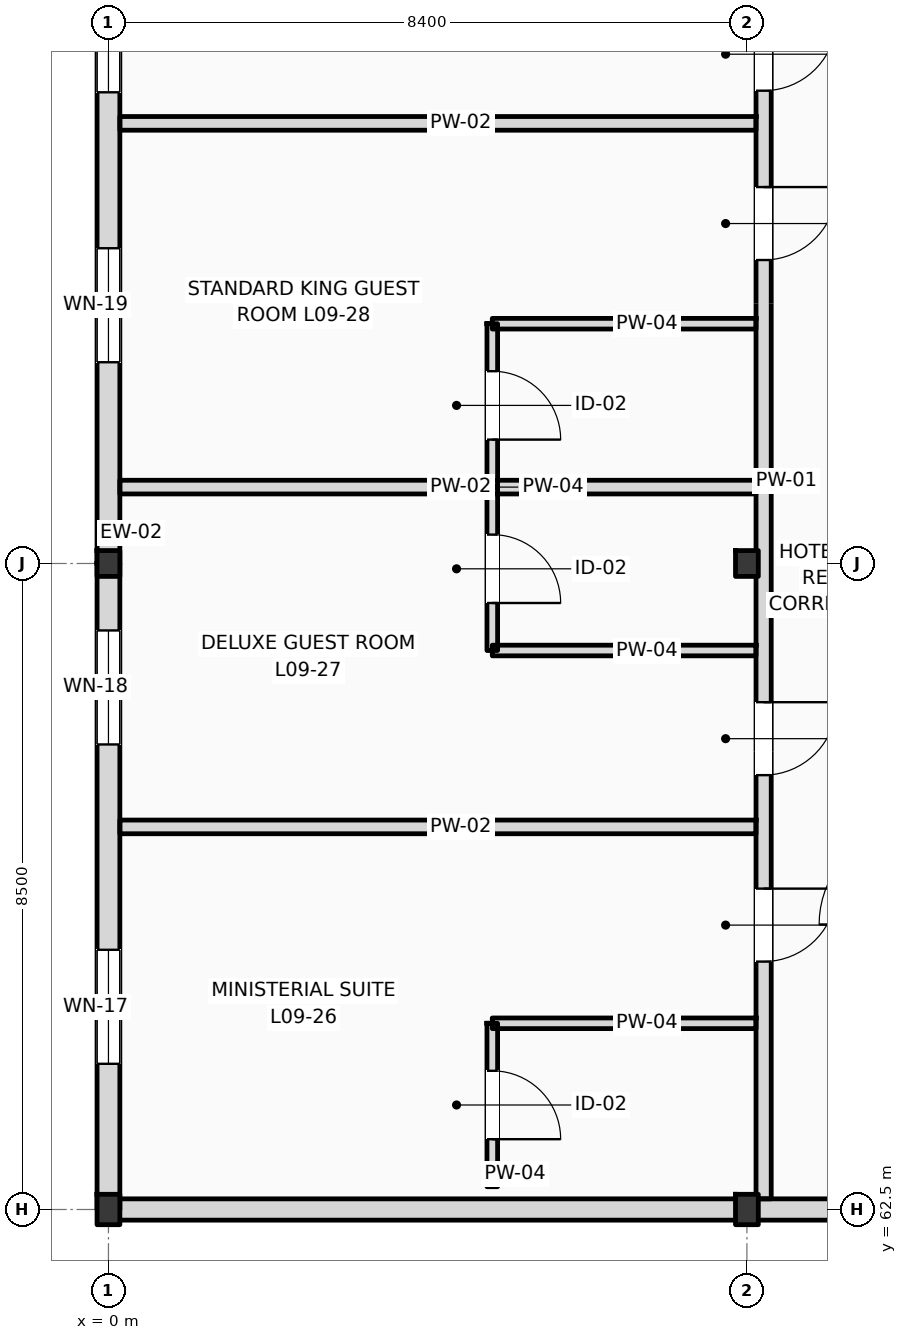
"""IFC4 building model, lengths in metres.
Left out: names, types, materials, properties, quantities, classifications, styles, units other than length and angle.
Written with IfcOpenShell. Run it as: python <this file> out.ifc"""

import sys

from ifc_helpers import new_model, si_unit, direction, frame, frame_2d, origin, origin_2d, place, context, subcontext, project, spatial, rectangle, i_section, extrude, element, fill, save


model = new_model("IFC4")
c1 = context("Model", 3, precision=1e-05, world=origin(), true_north=direction((0.0, 1.0)))
c2 = subcontext(c1, "Body", "Model", "MODEL_VIEW")
j1 = project(units=[si_unit("LENGTHUNIT", "METRE"), si_unit("PLANEANGLEUNIT", "RADIAN")], contexts=[c1])
p1 = place(None, origin())
s1 = spatial("IfcSite", under=j1, at=p1, CompositionType="ELEMENT")
p2 = place(p1, origin())
s2 = spatial("IfcBuilding", under=s1, at=p2, CompositionType="ELEMENT")
p3 = place(p2, frame((0.0, 0.0, 39.0)))
s3 = spatial("IfcBuildingStorey", under=s2, at=p3, CompositionType="ELEMENT", Elevation=39.0)
p4 = place(p3, frame((0.0, 62.5, 0.0), z_axis=(0.0, 0.0, 1.0), x_axis=(1.0, 0.0, 0.0)))
e1 = element("IfcColumn", 1, at=p4, inside=s3, PredefinedType="COLUMN", context=c2, shape_type="SweptSolid", body=[
    extrude(i_section(OverallWidth=0.3, OverallDepth=0.4, WebThickness=0.013, FlangeThickness=0.024, FilletRadius=0.027, at=origin_2d()), origin(), (0.0, 0.0, 1.0), 3.6),
])
p5 = place(p3, frame((0.0, 71.0, 0.0), z_axis=(0.0, 0.0, 1.0), x_axis=(1.0, 0.0, 0.0)))
e2 = element("IfcColumn", 2, at=p5, inside=s3, PredefinedType="COLUMN", context=c2, shape_type="SweptSolid", body=[
    extrude(i_section(OverallWidth=0.3, OverallDepth=0.34, WebThickness=0.012, FlangeThickness=0.021, FilletRadius=0.027, at=origin_2d()), origin(), (0.0, 0.0, 1.0), 3.6),
])
p6 = place(p3, frame((8.4, 62.5, 0.0), z_axis=(0.0, 0.0, 1.0), x_axis=(1.0, 0.0, 0.0)))
e3 = element("IfcColumn", 3, at=p6, inside=s3, PredefinedType="COLUMN", context=c2, shape_type="SweptSolid", body=[
    extrude(i_section(OverallWidth=0.3, OverallDepth=0.4, WebThickness=0.013, FlangeThickness=0.024, FilletRadius=0.027, at=origin_2d()), origin(), (0.0, 0.0, 1.0), 3.6),
])
p7 = place(p3, frame((8.4, 71.0, 0.0), z_axis=(0.0, 0.0, 1.0), x_axis=(1.0, 0.0, 0.0)))
e4 = element("IfcColumn", 4, at=p7, inside=s3, PredefinedType="COLUMN", context=c2, shape_type="SweptSolid", body=[
    extrude(i_section(OverallWidth=0.3, OverallDepth=0.34, WebThickness=0.012, FlangeThickness=0.021, FilletRadius=0.027, at=origin_2d()), origin(), (0.0, 0.0, 1.0), 3.6),
])
p8 = place(p3, frame((0.0, 62.5, 0.0), z_axis=(0.0, 0.0, 1.0), x_axis=(0.0, 1.0, 0.0)))
e5 = element("IfcWall", 5, at=p8, inside=s3, PredefinedType="STANDARD", context=c2, shape_type="SweptSolid", body=[
    extrude(rectangle(XDim=8.5, YDim=0.3, at=frame_2d((4.25, 0.0))), origin(), (0.0, 0.0, 1.0), 2.91),
])
p9 = place(p8, frame((1.917, 0.0, 0.9)))
e6 = element("IfcOpeningElement", 6, at=p9, cuts=e5, PredefinedType="OPENING", context=c2, shape_type="SweptSolid", body=[
    extrude(rectangle(XDim=1.5, YDim=1.83, at=frame_2d((0.75, 0.915))), frame((0.0, 0.16, 0.0), z_axis=(0.0, -1.0, 0.0), x_axis=(1.0, 0.0, 0.0)), (0.0, 0.0, 1.0), 0.32),
])
p10 = place(p8, frame((6.119, 0.0, 0.9)))
e7 = element("IfcOpeningElement", 7, at=p10, cuts=e5, PredefinedType="OPENING", context=c2, shape_type="SweptSolid", body=[
    extrude(rectangle(XDim=1.5, YDim=1.83, at=frame_2d((0.75, 0.915))), frame((0.0, 0.16, 0.0), z_axis=(0.0, -1.0, 0.0), x_axis=(1.0, 0.0, 0.0)), (0.0, 0.0, 1.0), 0.32),
])
p11 = place(p3, frame((0.0, 71.0, 0.0), z_axis=(0.0, 0.0, 1.0), x_axis=(0.0, 1.0, 0.0)))
e8 = element("IfcWall", 8, at=p11, inside=s3, PredefinedType="STANDARD", context=c2, shape_type="SweptSolid", body=[
    extrude(rectangle(XDim=8.5, YDim=0.3, at=frame_2d((4.25, 0.0))), origin(), (0.0, 0.0, 1.0), 2.91),
])
p12 = place(p11, frame((2.648, 0.0, 0.9)))
e9 = element("IfcOpeningElement", 9, at=p12, cuts=e8, PredefinedType="OPENING", context=c2, shape_type="SweptSolid", body=[
    extrude(rectangle(XDim=1.5, YDim=1.83, at=frame_2d((0.75, 0.915))), frame((0.0, 0.16, 0.0), z_axis=(0.0, -1.0, 0.0), x_axis=(1.0, 0.0, 0.0)), (0.0, 0.0, 1.0), 0.32),
])
p13 = place(p11, frame((6.2, 0.0, 0.9)))
e10 = element("IfcOpeningElement", 10, at=p13, cuts=e8, PredefinedType="OPENING", context=c2, shape_type="SweptSolid", body=[
    extrude(rectangle(XDim=1.5, YDim=1.83, at=frame_2d((0.75, 0.915))), frame((0.0, 0.16, 0.0), z_axis=(0.0, -1.0, 0.0), x_axis=(1.0, 0.0, 0.0)), (0.0, 0.0, 1.0), 0.32),
])
p14 = place(p3, frame((0.0, 62.5, 0.0), z_axis=(0.0, 0.0, 1.0), x_axis=(1.0, 0.0, 0.0)))
e11 = element("IfcWall", 11, at=p14, inside=s3, PredefinedType="STANDARD", context=c2, shape_type="SweptSolid", body=[
    extrude(rectangle(XDim=25.2, YDim=0.28, at=frame_2d((12.6, 0.0))), origin(), (0.0, 0.0, 1.0), 2.72),
])
p15 = place(p3, frame((8.62, 62.64, 0.0), z_axis=(0.0, 0.0, 1.0), x_axis=(0.0, 1.0, 0.0)))
e12 = element("IfcWall", 12, at=p15, inside=s3, PredefinedType="PARTITIONING", context=c2, shape_type="SweptSolid", body=[
    extrude(rectangle(XDim=32.66, YDim=0.2, at=frame_2d((16.33, 0.0))), origin(), (0.0, 0.0, 1.0), 2.91),
])
p16 = place(p15, frame((3.122, 0.0, 0.0)))
e13 = element("IfcOpeningElement", 13, at=p16, cuts=e12, PredefinedType="OPENING", context=c2, shape_type="SweptSolid", body=[
    extrude(rectangle(XDim=0.96, YDim=2.2, at=frame_2d((0.48, 1.1))), frame((0.0, 0.11, 0.0), z_axis=(0.0, -1.0, 0.0), x_axis=(1.0, 0.0, 0.0)), (0.0, 0.0, 1.0), 0.22),
])
p17 = place(p15, frame((5.575, 0.0, 0.0)))
e14 = element("IfcOpeningElement", 14, at=p17, cuts=e12, PredefinedType="OPENING", context=c2, shape_type="SweptSolid", body=[
    extrude(rectangle(XDim=0.96, YDim=2.2, at=frame_2d((0.48, 1.1))), frame((0.0, 0.11, 0.0), z_axis=(0.0, -1.0, 0.0), x_axis=(1.0, 0.0, 0.0)), (0.0, 0.0, 1.0), 0.22),
])
p18 = place(p15, frame((12.353, 0.0, 0.0)))
e15 = element("IfcOpeningElement", 15, at=p18, cuts=e12, PredefinedType="OPENING", context=c2, shape_type="SweptSolid", body=[
    extrude(rectangle(XDim=0.96, YDim=2.2, at=frame_2d((0.48, 1.1))), frame((0.0, 0.11, 0.0), z_axis=(0.0, -1.0, 0.0), x_axis=(1.0, 0.0, 0.0)), (0.0, 0.0, 1.0), 0.22),
])
p19 = place(p15, frame((14.581, 0.0, 0.0)))
e16 = element("IfcOpeningElement", 16, at=p19, cuts=e12, PredefinedType="OPENING", context=c2, shape_type="SweptSolid", body=[
    extrude(rectangle(XDim=0.96, YDim=2.2, at=frame_2d((0.48, 1.1))), frame((0.0, 0.11, 0.0), z_axis=(0.0, -1.0, 0.0), x_axis=(1.0, 0.0, 0.0)), (0.0, 0.0, 1.0), 0.22),
])
p20 = place(p15, frame((21.61, 0.0, 0.0)))
e17 = element("IfcOpeningElement", 17, at=p20, cuts=e12, PredefinedType="OPENING", context=c2, shape_type="SweptSolid", body=[
    extrude(rectangle(XDim=0.96, YDim=2.2, at=frame_2d((0.48, 1.1))), frame((0.0, 0.11, 0.0), z_axis=(0.0, -1.0, 0.0), x_axis=(1.0, 0.0, 0.0)), (0.0, 0.0, 1.0), 0.22),
])
p21 = place(p15, frame((26.488, 0.0, 0.0)))
e18 = element("IfcOpeningElement", 18, at=p21, cuts=e12, PredefinedType="OPENING", context=c2, shape_type="SweptSolid", body=[
    extrude(rectangle(XDim=0.96, YDim=2.2, at=frame_2d((0.48, 1.1))), frame((0.0, 0.11, 0.0), z_axis=(0.0, -1.0, 0.0), x_axis=(1.0, 0.0, 0.0)), (0.0, 0.0, 1.0), 0.22),
])
p22 = place(p15, frame((30.814, 0.0, 0.0)))
e19 = element("IfcOpeningElement", 19, at=p22, cuts=e12, PredefinedType="OPENING", context=c2, shape_type="SweptSolid", body=[
    extrude(rectangle(XDim=0.96, YDim=2.2, at=frame_2d((0.48, 1.1))), frame((0.0, 0.11, 0.0), z_axis=(0.0, -1.0, 0.0), x_axis=(1.0, 0.0, 0.0)), (0.0, 0.0, 1.0), 0.22),
])
p23 = place(p3, frame((0.15, 67.534, 0.0), z_axis=(0.0, 0.0, 1.0), x_axis=(1.0, 0.0, 0.0)))
e20 = element("IfcWall", 20, at=p23, inside=s3, PredefinedType="PARTITIONING", context=c2, shape_type="SweptSolid", body=[
    extrude(rectangle(XDim=8.37, YDim=0.18, at=frame_2d((4.185, 0.0))), origin(), (0.0, 0.0, 1.0), 3.38),
])
p24 = place(p3, frame((5.05, 64.95, 0.0), z_axis=(0.0, 0.0, 1.0), x_axis=(1.0, 0.0, 0.0)))
e21 = element("IfcWall", 21, at=p24, inside=s3, PredefinedType="PARTITIONING", context=c2, shape_type="SweptSolid", body=[
    extrude(rectangle(XDim=3.47, YDim=0.14, at=frame_2d((1.735, 0.0))), origin(), (0.0, 0.0, 1.0), 3.38),
])
p25 = place(p3, frame((5.05, 62.8, 0.0), z_axis=(0.0, 0.0, 1.0), x_axis=(0.0, 1.0, 0.0)))
e22 = element("IfcWall", 22, at=p25, inside=s3, PredefinedType="PARTITIONING", context=c2, shape_type="SweptSolid", body=[
    extrude(rectangle(XDim=2.15, YDim=0.14, at=frame_2d((1.075, 0.0))), origin(), (0.0, 0.0, 1.0), 3.38),
])
p26 = place(p25, frame((0.625, 0.0, 0.0)))
e23 = element("IfcOpeningElement", 23, at=p26, cuts=e22, PredefinedType="OPENING", context=c2, shape_type="SweptSolid", body=[
    extrude(rectangle(XDim=0.9, YDim=2.1, at=frame_2d((0.45, 1.05))), frame((0.0, 0.08, 0.0), z_axis=(0.0, -1.0, 0.0), x_axis=(1.0, 0.0, 0.0)), (0.0, 0.0, 1.0), 0.16),
])
p27 = place(p3, frame((0.15, 72.005, 0.0), z_axis=(0.0, 0.0, 1.0), x_axis=(1.0, 0.0, 0.0)))
e24 = element("IfcWall", 24, at=p27, inside=s3, PredefinedType="PARTITIONING", context=c2, shape_type="SweptSolid", body=[
    extrude(rectangle(XDim=8.37, YDim=0.18, at=frame_2d((4.185, 0.0))), origin(), (0.0, 0.0, 1.0), 3.38),
])
p28 = place(p3, frame((5.05, 69.855, 0.0), z_axis=(0.0, 0.0, 1.0), x_axis=(1.0, 0.0, 0.0)))
e25 = element("IfcWall", 25, at=p28, inside=s3, PredefinedType="PARTITIONING", context=c2, shape_type="SweptSolid", body=[
    extrude(rectangle(XDim=3.47, YDim=0.14, at=frame_2d((1.735, 0.0))), origin(), (0.0, 0.0, 1.0), 3.38),
])
p29 = place(p3, frame((5.05, 69.855, 0.0), z_axis=(0.0, 0.0, 1.0), x_axis=(0.0, 1.0, 0.0)))
e26 = element("IfcWall", 26, at=p29, inside=s3, PredefinedType="PARTITIONING", context=c2, shape_type="SweptSolid", body=[
    extrude(rectangle(XDim=2.15, YDim=0.14, at=frame_2d((1.075, 0.0))), origin(), (0.0, 0.0, 1.0), 3.38),
])
p30 = place(p29, frame((0.625, 0.0, 0.0)))
e27 = element("IfcOpeningElement", 27, at=p30, cuts=e26, PredefinedType="OPENING", context=c2, shape_type="SweptSolid", body=[
    extrude(rectangle(XDim=0.9, YDim=2.1, at=frame_2d((0.45, 1.05))), frame((0.0, 0.08, 0.0), z_axis=(0.0, -1.0, 0.0), x_axis=(1.0, 0.0, 0.0)), (0.0, 0.0, 1.0), 0.16),
])
p31 = place(p3, frame((0.15, 76.791, 0.0), z_axis=(0.0, 0.0, 1.0), x_axis=(1.0, 0.0, 0.0)))
e28 = element("IfcWall", 28, at=p31, inside=s3, PredefinedType="PARTITIONING", context=c2, shape_type="SweptSolid", body=[
    extrude(rectangle(XDim=8.37, YDim=0.18, at=frame_2d((4.185, 0.0))), origin(), (0.0, 0.0, 1.0), 3.38),
])
p32 = place(p3, frame((5.05, 74.155, 0.0), z_axis=(0.0, 0.0, 1.0), x_axis=(1.0, 0.0, 0.0)))
e29 = element("IfcWall", 29, at=p32, inside=s3, PredefinedType="PARTITIONING", context=c2, shape_type="SweptSolid", body=[
    extrude(rectangle(XDim=3.47, YDim=0.14, at=frame_2d((1.735, 0.0))), origin(), (0.0, 0.0, 1.0), 3.38),
])
p33 = place(p3, frame((5.05, 72.005, 0.0), z_axis=(0.0, 0.0, 1.0), x_axis=(0.0, 1.0, 0.0)))
e30 = element("IfcWall", 30, at=p33, inside=s3, PredefinedType="PARTITIONING", context=c2, shape_type="SweptSolid", body=[
    extrude(rectangle(XDim=2.15, YDim=0.14, at=frame_2d((1.075, 0.0))), origin(), (0.0, 0.0, 1.0), 3.38),
])
p34 = place(p33, frame((0.625, 0.0, 0.0)))
e31 = element("IfcOpeningElement", 31, at=p34, cuts=e30, PredefinedType="OPENING", context=c2, shape_type="SweptSolid", body=[
    extrude(rectangle(XDim=0.9, YDim=2.1, at=frame_2d((0.45, 1.05))), frame((0.0, 0.08, 0.0), z_axis=(0.0, -1.0, 0.0), x_axis=(1.0, 0.0, 0.0)), (0.0, 0.0, 1.0), 0.16),
])
p35 = place(p9, origin())
e32 = element("IfcWindow", 32, at=p35, inside=s3, PartitioningType="DOUBLE_PANEL_VERTICAL", PredefinedType="WINDOW", context=c2, shape_type="SweptSolid", body=[
    extrude(rectangle(XDim=1.5, YDim=1.83, at=frame_2d((0.75, 0.915))), frame((0.0, 0.03, 0.0), z_axis=(0.0, -1.0, 0.0), x_axis=(1.0, 0.0, 0.0)), (0.0, 0.0, 1.0), 0.06),
])
fill(e6, e32)
p36 = place(p10, origin())
e33 = element("IfcWindow", 33, at=p36, inside=s3, PartitioningType="DOUBLE_PANEL_VERTICAL", PredefinedType="WINDOW", context=c2, shape_type="SweptSolid", body=[
    extrude(rectangle(XDim=1.5, YDim=1.83, at=frame_2d((0.75, 0.915))), frame((0.0, 0.03, 0.0), z_axis=(0.0, -1.0, 0.0), x_axis=(1.0, 0.0, 0.0)), (0.0, 0.0, 1.0), 0.06),
])
fill(e7, e33)
p37 = place(p12, origin())
e34 = element("IfcWindow", 34, at=p37, inside=s3, PartitioningType="DOUBLE_PANEL_VERTICAL", PredefinedType="WINDOW", context=c2, shape_type="SweptSolid", body=[
    extrude(rectangle(XDim=1.5, YDim=1.83, at=frame_2d((0.75, 0.915))), frame((0.0, 0.03, 0.0), z_axis=(0.0, -1.0, 0.0), x_axis=(1.0, 0.0, 0.0)), (0.0, 0.0, 1.0), 0.06),
])
fill(e9, e34)
p38 = place(p13, origin())
e35 = element("IfcWindow", 35, at=p38, inside=s3, PartitioningType="DOUBLE_PANEL_VERTICAL", PredefinedType="WINDOW", context=c2, shape_type="SweptSolid", body=[
    extrude(rectangle(XDim=1.5, YDim=1.83, at=frame_2d((0.75, 0.915))), frame((0.0, 0.03, 0.0), z_axis=(0.0, -1.0, 0.0), x_axis=(1.0, 0.0, 0.0)), (0.0, 0.0, 1.0), 0.06),
])
fill(e10, e35)
p39 = place(p16, frame((0.96, 0.0, 0.0), z_axis=(0.0, 0.0, 1.0), x_axis=(-1.0, 0.0, 0.0)))
e36 = element("IfcDoor", 36, at=p39, inside=s3, OperationType="SINGLE_SWING_RIGHT", PredefinedType="DOOR", context=c2, shape_type="SweptSolid", body=[
    extrude(rectangle(XDim=0.96, YDim=2.2, at=frame_2d((0.48, 1.1))), frame((0.0, 0.025, 0.0), z_axis=(0.0, -1.0, 0.0), x_axis=(1.0, 0.0, 0.0)), (0.0, 0.0, 1.0), 0.05),
])
fill(e13, e36)
p40 = place(p26, frame((0.9, 0.0, 0.0), z_axis=(0.0, 0.0, 1.0), x_axis=(-1.0, 0.0, 0.0)))
e37 = element("IfcDoor", 37, at=p40, inside=s3, OperationType="SINGLE_SWING_LEFT", PredefinedType="DOOR", context=c2, shape_type="SweptSolid", body=[
    extrude(rectangle(XDim=0.9, YDim=2.1, at=frame_2d((0.45, 1.05))), frame((0.0, 0.025, 0.0), z_axis=(0.0, -1.0, 0.0), x_axis=(1.0, 0.0, 0.0)), (0.0, 0.0, 1.0), 0.05),
])
fill(e23, e37)
p41 = place(p17, frame((0.96, 0.0, 0.0), z_axis=(0.0, 0.0, 1.0), x_axis=(-1.0, 0.0, 0.0)))
e38 = element("IfcDoor", 38, at=p41, inside=s3, OperationType="SINGLE_SWING_RIGHT", PredefinedType="DOOR", context=c2, shape_type="SweptSolid", body=[
    extrude(rectangle(XDim=0.96, YDim=2.2, at=frame_2d((0.48, 1.1))), frame((0.0, 0.025, 0.0), z_axis=(0.0, -1.0, 0.0), x_axis=(1.0, 0.0, 0.0)), (0.0, 0.0, 1.0), 0.05),
])
fill(e14, e38)
p42 = place(p30, frame((0.9, 0.0, 0.0), z_axis=(0.0, 0.0, 1.0), x_axis=(-1.0, 0.0, 0.0)))
e39 = element("IfcDoor", 39, at=p42, inside=s3, OperationType="SINGLE_SWING_LEFT", PredefinedType="DOOR", context=c2, shape_type="SweptSolid", body=[
    extrude(rectangle(XDim=0.9, YDim=2.1, at=frame_2d((0.45, 1.05))), frame((0.0, 0.025, 0.0), z_axis=(0.0, -1.0, 0.0), x_axis=(1.0, 0.0, 0.0)), (0.0, 0.0, 1.0), 0.05),
])
fill(e27, e39)
p43 = place(p18, frame((0.96, 0.0, 0.0), z_axis=(0.0, 0.0, 1.0), x_axis=(-1.0, 0.0, 0.0)))
e40 = element("IfcDoor", 40, at=p43, inside=s3, OperationType="SINGLE_SWING_RIGHT", PredefinedType="DOOR", context=c2, shape_type="SweptSolid", body=[
    extrude(rectangle(XDim=0.96, YDim=2.2, at=frame_2d((0.48, 1.1))), frame((0.0, 0.025, 0.0), z_axis=(0.0, -1.0, 0.0), x_axis=(1.0, 0.0, 0.0)), (0.0, 0.0, 1.0), 0.05),
])
fill(e15, e40)
p44 = place(p34, frame((0.9, 0.0, 0.0), z_axis=(0.0, 0.0, 1.0), x_axis=(-1.0, 0.0, 0.0)))
e41 = element("IfcDoor", 41, at=p44, inside=s3, OperationType="SINGLE_SWING_LEFT", PredefinedType="DOOR", context=c2, shape_type="SweptSolid", body=[
    extrude(rectangle(XDim=0.9, YDim=2.1, at=frame_2d((0.45, 1.05))), frame((0.0, 0.025, 0.0), z_axis=(0.0, -1.0, 0.0), x_axis=(1.0, 0.0, 0.0)), (0.0, 0.0, 1.0), 0.05),
])
fill(e31, e41)
p45 = place(p19, frame((0.96, 0.0, 0.0), z_axis=(0.0, 0.0, 1.0), x_axis=(-1.0, 0.0, 0.0)))
e42 = element("IfcDoor", 42, at=p45, inside=s3, OperationType="SINGLE_SWING_RIGHT", PredefinedType="DOOR", context=c2, shape_type="SweptSolid", body=[
    extrude(rectangle(XDim=0.96, YDim=2.2, at=frame_2d((0.48, 1.1))), frame((0.0, 0.025, 0.0), z_axis=(0.0, -1.0, 0.0), x_axis=(1.0, 0.0, 0.0)), (0.0, 0.0, 1.0), 0.05),
])
fill(e16, e42)
save(model, sys.argv[1])
